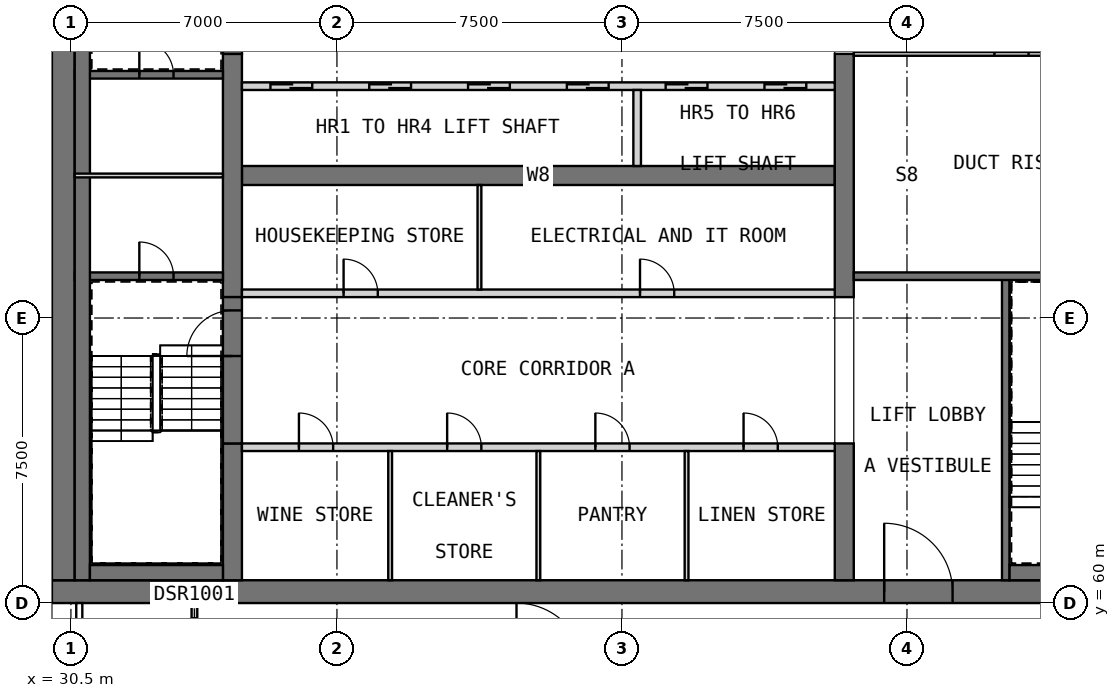
"""IFC4 building model, lengths in metres.
Left out: names, types, materials, properties, quantities, classifications, styles, units other than length and angle.
Written with IfcOpenShell. Run it as: python <this file> out.ifc"""

import sys

from ifc_helpers import new_model, si_unit, direction, frame, frame_2d, origin, place, context, subcontext, project, spatial, rectangle, extrude, element, fill, save


model = new_model("IFC4")
c1 = context("Model", 3, precision=1e-05, world=origin(), true_north=direction((0.0, 1.0)))
c2 = subcontext(c1, "Body", "Model", "MODEL_VIEW")
j1 = project(units=[si_unit("LENGTHUNIT", "METRE"), si_unit("PLANEANGLEUNIT", "RADIAN")], contexts=[c1])
p1 = place(None, origin())
s1 = spatial("IfcSite", under=j1, at=p1, CompositionType="ELEMENT")
p2 = place(p1, origin())
s2 = spatial("IfcBuilding", under=s1, at=p2, CompositionType="ELEMENT")
p3 = place(p2, frame((0.0, 0.0, 292.2)))
s3 = spatial("IfcBuildingStorey", under=s2, at=p3, CompositionType="ELEMENT", Elevation=292.2)
p4 = place(p3, frame((30.0, 60.3, 0.0), z_axis=(0.0, 0.0, 1.0), x_axis=(1.0, 0.0, 0.0)))
e1 = element("IfcWall", 1, at=p4, inside=s3, PredefinedType="SHEAR", context=c2, shape_type="SweptSolid", body=[
    extrude(rectangle(XDim=30.0, YDim=0.6, at=frame_2d((15.0, 0.0))), origin(), (0.0, 0.0, 1.0), 5.5),
])
p5 = place(p4, frame((21.9, 0.0, 0.0)))
e2 = element("IfcOpeningElement", 2, at=p5, cuts=e1, PredefinedType="OPENING", context=c2, shape_type="SweptSolid", body=[
    extrude(rectangle(XDim=1.8, YDim=2.1, at=frame_2d((0.9, 1.05))), frame((0.0, 0.31, 0.0), z_axis=(0.0, -1.0, 0.0), x_axis=(1.0, 0.0, 0.0)), (0.0, 0.0, 1.0), 0.62),
])
p6 = place(p4, frame((26.5, 0.0, 0.0)))
e3 = element("IfcOpeningElement", 3, at=p6, cuts=e1, PredefinedType="OPENING", context=c2, shape_type="SweptSolid", body=[
    extrude(rectangle(XDim=1.2, YDim=2.1, at=frame_2d((0.6, 1.05))), frame((0.0, 0.31, 0.0), z_axis=(0.0, -1.0, 0.0), x_axis=(1.0, 0.0, 0.0)), (0.0, 0.0, 1.0), 0.62),
])
p7 = place(p3, frame((30.3, 60.6, 0.0), z_axis=(0.0, 0.0, 1.0), x_axis=(0.0, 1.0, 0.0)))
e4 = element("IfcWall", 4, at=p7, inside=s3, PredefinedType="SHEAR", context=c2, shape_type="SweptSolid", body=[
    extrude(rectangle(XDim=21.3, YDim=0.6, at=frame_2d((10.65, 0.0))), origin(), (0.0, 0.0, 1.0), 5.5),
])
p8 = place(p3, frame((35.0, 71.25, 0.0), z_axis=(0.0, 0.0, 1.0), x_axis=(1.0, 0.0, 0.0)))
e5 = element("IfcWall", 5, at=p8, inside=s3, PredefinedType="SHEAR", context=c2, shape_type="SweptSolid", body=[
    extrude(rectangle(XDim=15.6, YDim=0.5, at=frame_2d((7.8, 0.0))), origin(), (0.0, 0.0, 1.0), 5.5),
])
p9 = place(p3, frame((34.75, 60.6, 0.0), z_axis=(0.0, 0.0, 1.0), x_axis=(0.0, 1.0, 0.0)))
e6 = element("IfcWall", 6, at=p9, inside=s3, PredefinedType="SHEAR", context=c2, shape_type="SweptSolid", body=[
    extrude(rectangle(XDim=3.6, YDim=0.5, at=frame_2d((1.8, 0.0))), origin(), (0.0, 0.0, 1.0), 5.5),
])
p10 = place(p3, frame((34.75, 68.05, 0.0), z_axis=(0.0, 0.0, 1.0), x_axis=(0.0, 1.0, 0.0)))
e7 = element("IfcWall", 7, at=p10, inside=s3, PredefinedType="SHEAR", context=c2, shape_type="SweptSolid", body=[
    extrude(rectangle(XDim=6.4, YDim=0.5, at=frame_2d((3.2, 0.0))), origin(), (0.0, 0.0, 1.0), 5.5),
])
p11 = place(p3, frame((50.85, 60.6, 0.0), z_axis=(0.0, 0.0, 1.0), x_axis=(0.0, 1.0, 0.0)))
e8 = element("IfcWall", 8, at=p11, inside=s3, PredefinedType="SHEAR", context=c2, shape_type="SweptSolid", body=[
    extrude(rectangle(XDim=3.6, YDim=0.5, at=frame_2d((1.8, 0.0))), origin(), (0.0, 0.0, 1.0), 5.5),
])
p12 = place(p3, frame((50.85, 68.05, 0.0), z_axis=(0.0, 0.0, 1.0), x_axis=(0.0, 1.0, 0.0)))
e9 = element("IfcWall", 9, at=p12, inside=s3, PredefinedType="SHEAR", context=c2, shape_type="SweptSolid", body=[
    extrude(rectangle(XDim=6.4, YDim=0.5, at=frame_2d((3.2, 0.0))), origin(), (0.0, 0.0, 1.0), 5.5),
])
p13 = place(p3, frame((35.0, 64.1, 0.0), z_axis=(0.0, 0.0, 1.0), x_axis=(1.0, 0.0, 0.0)))
e10 = element("IfcWall", 10, at=p13, inside=s3, PredefinedType="PARTITIONING", context=c2, shape_type="SweptSolid", body=[
    extrude(rectangle(XDim=15.6, YDim=0.2, at=frame_2d((7.8, 0.0))), origin(), (0.0, 0.0, 1.0), 5.2),
])
p14 = place(p13, frame((1.5, 0.0, 0.0)))
e11 = element("IfcOpeningElement", 11, at=p14, cuts=e10, PredefinedType="OPENING", context=c2, shape_type="SweptSolid", body=[
    extrude(rectangle(XDim=0.9, YDim=2.1, at=frame_2d((0.45, 1.05))), frame((0.0, 0.11, 0.0), z_axis=(0.0, -1.0, 0.0), x_axis=(1.0, 0.0, 0.0)), (0.0, 0.0, 1.0), 0.22),
])
p15 = place(p13, frame((5.4, 0.0, 0.0)))
e12 = element("IfcOpeningElement", 12, at=p15, cuts=e10, PredefinedType="OPENING", context=c2, shape_type="SweptSolid", body=[
    extrude(rectangle(XDim=0.9, YDim=2.1, at=frame_2d((0.45, 1.05))), frame((0.0, 0.11, 0.0), z_axis=(0.0, -1.0, 0.0), x_axis=(1.0, 0.0, 0.0)), (0.0, 0.0, 1.0), 0.22),
])
p16 = place(p13, frame((9.3, 0.0, 0.0)))
e13 = element("IfcOpeningElement", 13, at=p16, cuts=e10, PredefinedType="OPENING", context=c2, shape_type="SweptSolid", body=[
    extrude(rectangle(XDim=0.9, YDim=2.1, at=frame_2d((0.45, 1.05))), frame((0.0, 0.11, 0.0), z_axis=(0.0, -1.0, 0.0), x_axis=(1.0, 0.0, 0.0)), (0.0, 0.0, 1.0), 0.22),
])
p17 = place(p13, frame((13.2, 0.0, 0.0)))
e14 = element("IfcOpeningElement", 14, at=p17, cuts=e10, PredefinedType="OPENING", context=c2, shape_type="SweptSolid", body=[
    extrude(rectangle(XDim=0.9, YDim=2.1, at=frame_2d((0.45, 1.05))), frame((0.0, 0.11, 0.0), z_axis=(0.0, -1.0, 0.0), x_axis=(1.0, 0.0, 0.0)), (0.0, 0.0, 1.0), 0.22),
])
for number, where, z_axis, x_axis in (
    (15, (38.9, 60.6, 0.0), (0.0, 0.0, 1.0), (0.0, 1.0, 0.0)),
    (16, (42.8, 60.6, 0.0), (0.0, 0.0, 1.0), (0.0, 1.0, 0.0)),
    (17, (46.7, 60.6, 0.0), (0.0, 0.0, 1.0), (0.0, 1.0, 0.0)),
):
    element("IfcWall", number, at=place(p3, frame(where, z_axis=z_axis, x_axis=x_axis)), inside=s3, PredefinedType="PARTITIONING", context=c2, shape_type="SweptSolid", body=[
        extrude(rectangle(XDim=3.4, YDim=0.1, at=frame_2d((1.7, 0.0))), origin(), (0.0, 0.0, 1.0), 5.2),
    ])
p18 = place(p3, frame((35.0, 68.15, 0.0), z_axis=(0.0, 0.0, 1.0), x_axis=(1.0, 0.0, 0.0)))
e18 = element("IfcWall", 18, at=p18, inside=s3, PredefinedType="PARTITIONING", context=c2, shape_type="SweptSolid", body=[
    extrude(rectangle(XDim=15.6, YDim=0.2, at=frame_2d((7.8, 0.0))), origin(), (0.0, 0.0, 1.0), 5.2),
])
p19 = place(p18, frame((2.675, 0.0, 0.0)))
e19 = element("IfcOpeningElement", 19, at=p19, cuts=e18, PredefinedType="OPENING", context=c2, shape_type="SweptSolid", body=[
    extrude(rectangle(XDim=0.9, YDim=2.1, at=frame_2d((0.45, 1.05))), frame((0.0, 0.11, 0.0), z_axis=(0.0, -1.0, 0.0), x_axis=(1.0, 0.0, 0.0)), (0.0, 0.0, 1.0), 0.22),
])
p20 = place(p18, frame((10.475, 0.0, 0.0)))
e20 = element("IfcOpeningElement", 20, at=p20, cuts=e18, PredefinedType="OPENING", context=c2, shape_type="SweptSolid", body=[
    extrude(rectangle(XDim=0.9, YDim=2.1, at=frame_2d((0.45, 1.05))), frame((0.0, 0.11, 0.0), z_axis=(0.0, -1.0, 0.0), x_axis=(1.0, 0.0, 0.0)), (0.0, 0.0, 1.0), 0.22),
])
p21 = place(p3, frame((41.25, 68.25, 0.0), z_axis=(0.0, 0.0, 1.0), x_axis=(0.0, 1.0, 0.0)))
e21 = element("IfcWall", 21, at=p21, inside=s3, PredefinedType="PARTITIONING", context=c2, shape_type="SweptSolid", body=[
    extrude(rectangle(XDim=2.75, YDim=0.1, at=frame_2d((1.375, 0.0))), origin(), (0.0, 0.0, 1.0), 5.2),
])
p22 = place(p3, frame((35.0, 73.6, 0.0), z_axis=(0.0, 0.0, 1.0), x_axis=(1.0, 0.0, 0.0)))
e22 = element("IfcWall", 22, at=p22, inside=s3, PredefinedType="SOLIDWALL", context=c2, shape_type="SweptSolid", body=[
    extrude(rectangle(XDim=15.6, YDim=0.2, at=frame_2d((7.8, 0.0))), origin(), (0.0, 0.0, 1.0), 5.5),
])
p23 = place(p22, frame((0.75, 0.0, 0.0)))
e23 = element("IfcOpeningElement", 23, at=p23, cuts=e22, PredefinedType="OPENING", context=c2, shape_type="SweptSolid", body=[
    extrude(rectangle(XDim=1.1, YDim=2.1, at=frame_2d((0.55, 1.05))), frame((0.0, 0.11, 0.0), z_axis=(0.0, -1.0, 0.0), x_axis=(1.0, 0.0, 0.0)), (0.0, 0.0, 1.0), 0.22),
])
p24 = place(p22, frame((3.35, 0.0, 0.0)))
e24 = element("IfcOpeningElement", 24, at=p24, cuts=e22, PredefinedType="OPENING", context=c2, shape_type="SweptSolid", body=[
    extrude(rectangle(XDim=1.1, YDim=2.1, at=frame_2d((0.55, 1.05))), frame((0.0, 0.11, 0.0), z_axis=(0.0, -1.0, 0.0), x_axis=(1.0, 0.0, 0.0)), (0.0, 0.0, 1.0), 0.22),
])
p25 = place(p22, frame((5.95, 0.0, 0.0)))
e25 = element("IfcOpeningElement", 25, at=p25, cuts=e22, PredefinedType="OPENING", context=c2, shape_type="SweptSolid", body=[
    extrude(rectangle(XDim=1.1, YDim=2.1, at=frame_2d((0.55, 1.05))), frame((0.0, 0.11, 0.0), z_axis=(0.0, -1.0, 0.0), x_axis=(1.0, 0.0, 0.0)), (0.0, 0.0, 1.0), 0.22),
])
p26 = place(p22, frame((8.55, 0.0, 0.0)))
e26 = element("IfcOpeningElement", 26, at=p26, cuts=e22, PredefinedType="OPENING", context=c2, shape_type="SweptSolid", body=[
    extrude(rectangle(XDim=1.1, YDim=2.1, at=frame_2d((0.55, 1.05))), frame((0.0, 0.11, 0.0), z_axis=(0.0, -1.0, 0.0), x_axis=(1.0, 0.0, 0.0)), (0.0, 0.0, 1.0), 0.22),
])
p27 = place(p22, frame((11.15, 0.0, 0.0)))
e27 = element("IfcOpeningElement", 27, at=p27, cuts=e22, PredefinedType="OPENING", context=c2, shape_type="SweptSolid", body=[
    extrude(rectangle(XDim=1.1, YDim=2.1, at=frame_2d((0.55, 1.05))), frame((0.0, 0.11, 0.0), z_axis=(0.0, -1.0, 0.0), x_axis=(1.0, 0.0, 0.0)), (0.0, 0.0, 1.0), 0.22),
])
p28 = place(p22, frame((13.75, 0.0, 0.0)))
e28 = element("IfcOpeningElement", 28, at=p28, cuts=e22, PredefinedType="OPENING", context=c2, shape_type="SweptSolid", body=[
    extrude(rectangle(XDim=1.1, YDim=2.1, at=frame_2d((0.55, 1.05))), frame((0.0, 0.11, 0.0), z_axis=(0.0, -1.0, 0.0), x_axis=(1.0, 0.0, 0.0)), (0.0, 0.0, 1.0), 0.22),
])
p29 = place(p3, frame((45.4, 71.5, 0.0), z_axis=(0.0, 0.0, 1.0), x_axis=(0.0, 1.0, 0.0)))
e29 = element("IfcWall", 29, at=p29, inside=s3, PredefinedType="SOLIDWALL", context=c2, shape_type="SweptSolid", body=[
    extrude(rectangle(XDim=2.0, YDim=0.2, at=frame_2d((1.0, 0.0))), origin(), (0.0, 0.0, 1.0), 5.5),
])
p30 = place(p3, frame((34.75, 64.2, 0.0), z_axis=(0.0, 0.0, 1.0), x_axis=(0.0, 1.0, 0.0)))
e30 = element("IfcWall", 30, at=p30, inside=s3, PredefinedType="SOLIDWALL", context=c2, shape_type="SweptSolid", body=[
    extrude(rectangle(XDim=3.85, YDim=0.5, at=frame_2d((1.925, 0.0))), origin(), (0.0, 0.0, 1.0), 4.3),
])
p31 = place(p30, frame((2.3, 0.0, 0.0)))
e31 = element("IfcOpeningElement", 31, at=p31, cuts=e30, PredefinedType="OPENING", context=c2, shape_type="SweptSolid", body=[
    extrude(rectangle(XDim=1.2, YDim=2.1, at=frame_2d((0.6, 1.05))), frame((0.0, 0.26, 0.0), z_axis=(0.0, -1.0, 0.0), x_axis=(1.0, 0.0, 0.0)), (0.0, 0.0, 1.0), 0.52),
])
p32 = place(p3, frame((34.75, 74.45, 0.0), z_axis=(0.0, 0.0, 1.0), x_axis=(0.0, 1.0, 0.0)))
e32 = element("IfcWall", 32, at=p32, inside=s3, PredefinedType="SOLIDWALL", context=c2, shape_type="SweptSolid", body=[
    extrude(rectangle(XDim=3.85, YDim=0.5, at=frame_2d((1.925, 0.0))), origin(), (0.0, 0.0, 1.0), 4.3),
])
p33 = place(p32, frame((1.0, 0.0, 0.0)))
e33 = element("IfcOpeningElement", 33, at=p33, cuts=e32, PredefinedType="OPENING", context=c2, shape_type="SweptSolid", body=[
    extrude(rectangle(XDim=1.2, YDim=2.1, at=frame_2d((0.6, 1.05))), frame((0.0, 0.26, 0.0), z_axis=(0.0, -1.0, 0.0), x_axis=(1.0, 0.0, 0.0)), (0.0, 0.0, 1.0), 0.52),
])
p34 = place(p3, frame((30.6, 68.6, 0.0), z_axis=(0.0, 0.0, 1.0), x_axis=(1.0, 0.0, 0.0)))
e34 = element("IfcWall", 34, at=p34, inside=s3, PredefinedType="SOLIDWALL", context=c2, shape_type="SweptSolid", body=[
    extrude(rectangle(XDim=3.9, YDim=0.2, at=frame_2d((1.95, 0.0))), origin(), (0.0, 0.0, 1.0), 5.2),
])
p35 = place(p34, frame((1.7, 0.0, 0.0)))
e35 = element("IfcOpeningElement", 35, at=p35, cuts=e34, PredefinedType="OPENING", context=c2, shape_type="SweptSolid", body=[
    extrude(rectangle(XDim=0.9, YDim=2.1, at=frame_2d((0.45, 1.05))), frame((0.0, 0.11, 0.0), z_axis=(0.0, -1.0, 0.0), x_axis=(1.0, 0.0, 0.0)), (0.0, 0.0, 1.0), 0.22),
])
p36 = place(p3, frame((30.6, 73.9, 0.0), z_axis=(0.0, 0.0, 1.0), x_axis=(1.0, 0.0, 0.0)))
e36 = element("IfcWall", 36, at=p36, inside=s3, PredefinedType="SOLIDWALL", context=c2, shape_type="SweptSolid", body=[
    extrude(rectangle(XDim=3.9, YDim=0.2, at=frame_2d((1.95, 0.0))), origin(), (0.0, 0.0, 1.0), 5.2),
])
p37 = place(p36, frame((1.7, 0.0, 0.0)))
e37 = element("IfcOpeningElement", 37, at=p37, cuts=e36, PredefinedType="OPENING", context=c2, shape_type="SweptSolid", body=[
    extrude(rectangle(XDim=0.9, YDim=2.1, at=frame_2d((0.45, 1.05))), frame((0.0, 0.11, 0.0), z_axis=(0.0, -1.0, 0.0), x_axis=(1.0, 0.0, 0.0)), (0.0, 0.0, 1.0), 0.22),
])
p38 = place(p3, frame((55.1, 60.6, 0.0), z_axis=(0.0, 0.0, 1.0), x_axis=(0.0, 1.0, 0.0)))
e38 = element("IfcWall", 38, at=p38, inside=s3, PredefinedType="SOLIDWALL", context=c2, shape_type="SweptSolid", body=[
    extrude(rectangle(XDim=8.0, YDim=0.2, at=frame_2d((4.0, 0.0))), origin(), (0.0, 0.0, 1.0), 5.2),
])
p39 = place(p3, frame((51.1, 68.6, 0.0), z_axis=(0.0, 0.0, 1.0), x_axis=(1.0, 0.0, 0.0)))
e39 = element("IfcWall", 39, at=p39, inside=s3, PredefinedType="SOLIDWALL", context=c2, shape_type="SweptSolid", body=[
    extrude(rectangle(XDim=8.3, YDim=0.2, at=frame_2d((4.15, 0.0))), origin(), (0.0, 0.0, 1.0), 5.2),
])
p40 = place(p3, frame((30.8, 60.6, 0.0), z_axis=(0.0, 0.0, 1.0), x_axis=(0.0, 1.0, 0.0)))
e40 = element("IfcWall", 40, at=p40, inside=s3, PredefinedType="SOLIDWALL", context=c2, shape_type="SweptSolid", body=[
    extrude(rectangle(XDim=21.3, YDim=0.4, at=frame_2d((10.65, 0.0))), origin(), (0.0, 0.0, 1.0), 5.2),
])
p41 = place(p3, frame((31.0, 60.8, 0.0), z_axis=(0.0, 0.0, 1.0), x_axis=(1.0, 0.0, 0.0)))
e41 = element("IfcWall", 41, at=p41, inside=s3, PredefinedType="SOLIDWALL", context=c2, shape_type="SweptSolid", body=[
    extrude(rectangle(XDim=3.5, YDim=0.4, at=frame_2d((1.75, 0.0))), origin(), (0.0, 0.0, 1.0), 5.2),
])
p42 = place(p3, frame((55.2, 60.8, 0.0), z_axis=(0.0, 0.0, 1.0), x_axis=(1.0, 0.0, 0.0)))
e42 = element("IfcWall", 42, at=p42, inside=s3, PredefinedType="SOLIDWALL", context=c2, shape_type="SweptSolid", body=[
    extrude(rectangle(XDim=1.3, YDim=0.4, at=frame_2d((0.65, 0.0))), origin(), (0.0, 0.0, 1.0), 5.2),
])
p43 = place(p3, frame((30.6, 71.25, 0.0), z_axis=(0.0, 0.0, 1.0), x_axis=(1.0, 0.0, 0.0)))
e43 = element("IfcWall", 43, at=p43, inside=s3, PredefinedType="PARTITIONING", context=c2, shape_type="SweptSolid", body=[
    extrude(rectangle(XDim=3.9, YDim=0.1, at=frame_2d((1.95, 0.0))), origin(), (0.0, 0.0, 1.0), 5.2),
])
p44 = place(p3, frame((51.1, 74.45, 0.0), z_axis=(0.0, 0.0, 1.0), x_axis=(1.0, 0.0, 0.0)))
e44 = element("IfcWall", 44, at=p44, inside=s3, PredefinedType="PARTITIONING", context=c2, shape_type="SweptSolid", body=[
    extrude(rectangle(XDim=8.3, YDim=0.1, at=frame_2d((4.15, 0.0))), origin(), (0.0, 0.0, 1.0), 5.2),
])
p45 = place(p44, frame((3.7, 0.0, 0.0)))
e45 = element("IfcOpeningElement", 45, at=p45, cuts=e44, PredefinedType="OPENING", context=c2, shape_type="SweptSolid", body=[
    extrude(rectangle(XDim=0.9, YDim=2.1, at=frame_2d((0.45, 1.05))), frame((0.0, 0.06, 0.0), z_axis=(0.0, -1.0, 0.0), x_axis=(1.0, 0.0, 0.0)), (0.0, 0.0, 1.0), 0.12),
])
p46 = place(p3, frame((33.75, 58.275, 0.0), z_axis=(0.0, 0.0, 1.0), x_axis=(0.0, 1.0, 0.0)))
e46 = element("IfcWall", 46, at=p46, inside=s3, PredefinedType="PARTITIONING", context=c2, shape_type="SweptSolid", body=[
    extrude(rectangle(XDim=1.725, YDim=0.15, at=frame_2d((0.863, 0.0))), origin(), (0.0, 0.0, 1.0), 5.2),
])
p47 = place(p46, frame((0.325, 0.0, 0.0)))
e47 = element("IfcOpeningElement", 47, at=p47, cuts=e46, PredefinedType="OPENING", context=c2, shape_type="SweptSolid", body=[
    extrude(rectangle(XDim=1.0, YDim=2.1, at=frame_2d((0.5, 1.05))), frame((0.0, 0.085, 0.0), z_axis=(0.0, -1.0, 0.0), x_axis=(1.0, 0.0, 0.0)), (0.0, 0.0, 1.0), 0.17),
])
p48 = place(p14, origin())
e48 = element("IfcDoor", 48, at=p48, inside=s3, OperationType="SINGLE_SWING_LEFT", PredefinedType="DOOR", context=c2, shape_type="SweptSolid", body=[
    extrude(rectangle(XDim=0.9, YDim=2.1, at=frame_2d((0.45, 1.05))), frame((0.0, 0.025, 0.0), z_axis=(0.0, -1.0, 0.0), x_axis=(1.0, 0.0, 0.0)), (0.0, 0.0, 1.0), 0.05),
])
fill(e11, e48)
p49 = place(p15, origin())
e49 = element("IfcDoor", 49, at=p49, inside=s3, OperationType="SINGLE_SWING_RIGHT", PredefinedType="DOOR", context=c2, shape_type="SweptSolid", body=[
    extrude(rectangle(XDim=0.9, YDim=2.1, at=frame_2d((0.45, 1.05))), frame((0.0, 0.025, 0.0), z_axis=(0.0, -1.0, 0.0), x_axis=(1.0, 0.0, 0.0)), (0.0, 0.0, 1.0), 0.05),
])
fill(e12, e49)
p50 = place(p16, origin())
e50 = element("IfcDoor", 50, at=p50, inside=s3, OperationType="SINGLE_SWING_LEFT", PredefinedType="DOOR", context=c2, shape_type="SweptSolid", body=[
    extrude(rectangle(XDim=0.9, YDim=2.1, at=frame_2d((0.45, 1.05))), frame((0.0, 0.025, 0.0), z_axis=(0.0, -1.0, 0.0), x_axis=(1.0, 0.0, 0.0)), (0.0, 0.0, 1.0), 0.05),
])
fill(e13, e50)
p51 = place(p17, origin())
e51 = element("IfcDoor", 51, at=p51, inside=s3, OperationType="SINGLE_SWING_RIGHT", PredefinedType="DOOR", context=c2, shape_type="SweptSolid", body=[
    extrude(rectangle(XDim=0.9, YDim=2.1, at=frame_2d((0.45, 1.05))), frame((0.0, 0.025, 0.0), z_axis=(0.0, -1.0, 0.0), x_axis=(1.0, 0.0, 0.0)), (0.0, 0.0, 1.0), 0.05),
])
fill(e14, e51)
p52 = place(p19, origin())
e52 = element("IfcDoor", 52, at=p52, inside=s3, OperationType="SINGLE_SWING_LEFT", PredefinedType="DOOR", context=c2, shape_type="SweptSolid", body=[
    extrude(rectangle(XDim=0.9, YDim=2.1, at=frame_2d((0.45, 1.05))), frame((0.0, 0.025, 0.0), z_axis=(0.0, -1.0, 0.0), x_axis=(1.0, 0.0, 0.0)), (0.0, 0.0, 1.0), 0.05),
])
fill(e19, e52)
p53 = place(p20, origin())
e53 = element("IfcDoor", 53, at=p53, inside=s3, OperationType="SINGLE_SWING_RIGHT", PredefinedType="DOOR", context=c2, shape_type="SweptSolid", body=[
    extrude(rectangle(XDim=0.9, YDim=2.1, at=frame_2d((0.45, 1.05))), frame((0.0, 0.025, 0.0), z_axis=(0.0, -1.0, 0.0), x_axis=(1.0, 0.0, 0.0)), (0.0, 0.0, 1.0), 0.05),
])
fill(e20, e53)
p54 = place(p23, origin())
e54 = element("IfcDoor", 54, at=p54, inside=s3, OperationType="DOUBLE_DOOR_SLIDING", PredefinedType="DOOR", context=c2, shape_type="SweptSolid", body=[
    extrude(rectangle(XDim=1.1, YDim=2.1, at=frame_2d((0.55, 1.05))), frame((0.0, 0.025, 0.0), z_axis=(0.0, -1.0, 0.0), x_axis=(1.0, 0.0, 0.0)), (0.0, 0.0, 1.0), 0.05),
])
fill(e23, e54)
p55 = place(p24, origin())
e55 = element("IfcDoor", 55, at=p55, inside=s3, OperationType="DOUBLE_DOOR_SLIDING", PredefinedType="DOOR", context=c2, shape_type="SweptSolid", body=[
    extrude(rectangle(XDim=1.1, YDim=2.1, at=frame_2d((0.55, 1.05))), frame((0.0, 0.025, 0.0), z_axis=(0.0, -1.0, 0.0), x_axis=(1.0, 0.0, 0.0)), (0.0, 0.0, 1.0), 0.05),
])
fill(e24, e55)
p56 = place(p25, origin())
e56 = element("IfcDoor", 56, at=p56, inside=s3, OperationType="DOUBLE_DOOR_SLIDING", PredefinedType="DOOR", context=c2, shape_type="SweptSolid", body=[
    extrude(rectangle(XDim=1.1, YDim=2.1, at=frame_2d((0.55, 1.05))), frame((0.0, 0.025, 0.0), z_axis=(0.0, -1.0, 0.0), x_axis=(1.0, 0.0, 0.0)), (0.0, 0.0, 1.0), 0.05),
])
fill(e25, e56)
p57 = place(p26, origin())
e57 = element("IfcDoor", 57, at=p57, inside=s3, OperationType="DOUBLE_DOOR_SLIDING", PredefinedType="DOOR", context=c2, shape_type="SweptSolid", body=[
    extrude(rectangle(XDim=1.1, YDim=2.1, at=frame_2d((0.55, 1.05))), frame((0.0, 0.025, 0.0), z_axis=(0.0, -1.0, 0.0), x_axis=(1.0, 0.0, 0.0)), (0.0, 0.0, 1.0), 0.05),
])
fill(e26, e57)
p58 = place(p27, origin())
e58 = element("IfcDoor", 58, at=p58, inside=s3, OperationType="DOUBLE_DOOR_SLIDING", PredefinedType="DOOR", context=c2, shape_type="SweptSolid", body=[
    extrude(rectangle(XDim=1.1, YDim=2.1, at=frame_2d((0.55, 1.05))), frame((0.0, 0.025, 0.0), z_axis=(0.0, -1.0, 0.0), x_axis=(1.0, 0.0, 0.0)), (0.0, 0.0, 1.0), 0.05),
])
fill(e27, e58)
p59 = place(p28, origin())
e59 = element("IfcDoor", 59, at=p59, inside=s3, OperationType="DOUBLE_DOOR_SLIDING", PredefinedType="DOOR", context=c2, shape_type="SweptSolid", body=[
    extrude(rectangle(XDim=1.1, YDim=2.1, at=frame_2d((0.55, 1.05))), frame((0.0, 0.025, 0.0), z_axis=(0.0, -1.0, 0.0), x_axis=(1.0, 0.0, 0.0)), (0.0, 0.0, 1.0), 0.05),
])
fill(e28, e59)
p60 = place(p5, origin())
e60 = element("IfcDoor", 60, at=p60, inside=s3, OperationType="DOUBLE_DOOR_SINGLE_SWING", PredefinedType="DOOR", context=c2, shape_type="SweptSolid", body=[
    extrude(rectangle(XDim=1.8, YDim=2.1, at=frame_2d((0.9, 1.05))), frame((0.0, 0.025, 0.0), z_axis=(0.0, -1.0, 0.0), x_axis=(1.0, 0.0, 0.0)), (0.0, 0.0, 1.0), 0.05),
])
fill(e2, e60)
p61 = place(p31, origin())
e61 = element("IfcDoor", 61, at=p61, inside=s3, OperationType="SINGLE_SWING_LEFT", PredefinedType="DOOR", context=c2, shape_type="SweptSolid", body=[
    extrude(rectangle(XDim=1.2, YDim=2.1, at=frame_2d((0.6, 1.05))), frame((0.0, 0.025, 0.0), z_axis=(0.0, -1.0, 0.0), x_axis=(1.0, 0.0, 0.0)), (0.0, 0.0, 1.0), 0.05),
])
fill(e31, e61)
p62 = place(p35, origin())
e62 = element("IfcDoor", 62, at=p62, inside=s3, OperationType="SINGLE_SWING_LEFT", PredefinedType="DOOR", context=c2, shape_type="SweptSolid", body=[
    extrude(rectangle(XDim=0.9, YDim=2.1, at=frame_2d((0.45, 1.05))), frame((0.0, 0.025, 0.0), z_axis=(0.0, -1.0, 0.0), x_axis=(1.0, 0.0, 0.0)), (0.0, 0.0, 1.0), 0.05),
])
fill(e35, e62)
p63 = place(p37, origin())
e63 = element("IfcDoor", 63, at=p63, inside=s3, OperationType="SINGLE_SWING_RIGHT", PredefinedType="DOOR", context=c2, shape_type="SweptSolid", body=[
    extrude(rectangle(XDim=0.9, YDim=2.1, at=frame_2d((0.45, 1.05))), frame((0.0, 0.025, 0.0), z_axis=(0.0, -1.0, 0.0), x_axis=(1.0, 0.0, 0.0)), (0.0, 0.0, 1.0), 0.05),
])
fill(e37, e63)
p64 = place(p45, origin())
e64 = element("IfcDoor", 64, at=p64, inside=s3, OperationType="SINGLE_SWING_LEFT", PredefinedType="DOOR", context=c2, shape_type="SweptSolid", body=[
    extrude(rectangle(XDim=0.9, YDim=2.1, at=frame_2d((0.45, 1.05))), frame((0.0, 0.025, 0.0), z_axis=(0.0, -1.0, 0.0), x_axis=(1.0, 0.0, 0.0)), (0.0, 0.0, 1.0), 0.05),
])
fill(e45, e64)
save(model, sys.argv[1])
